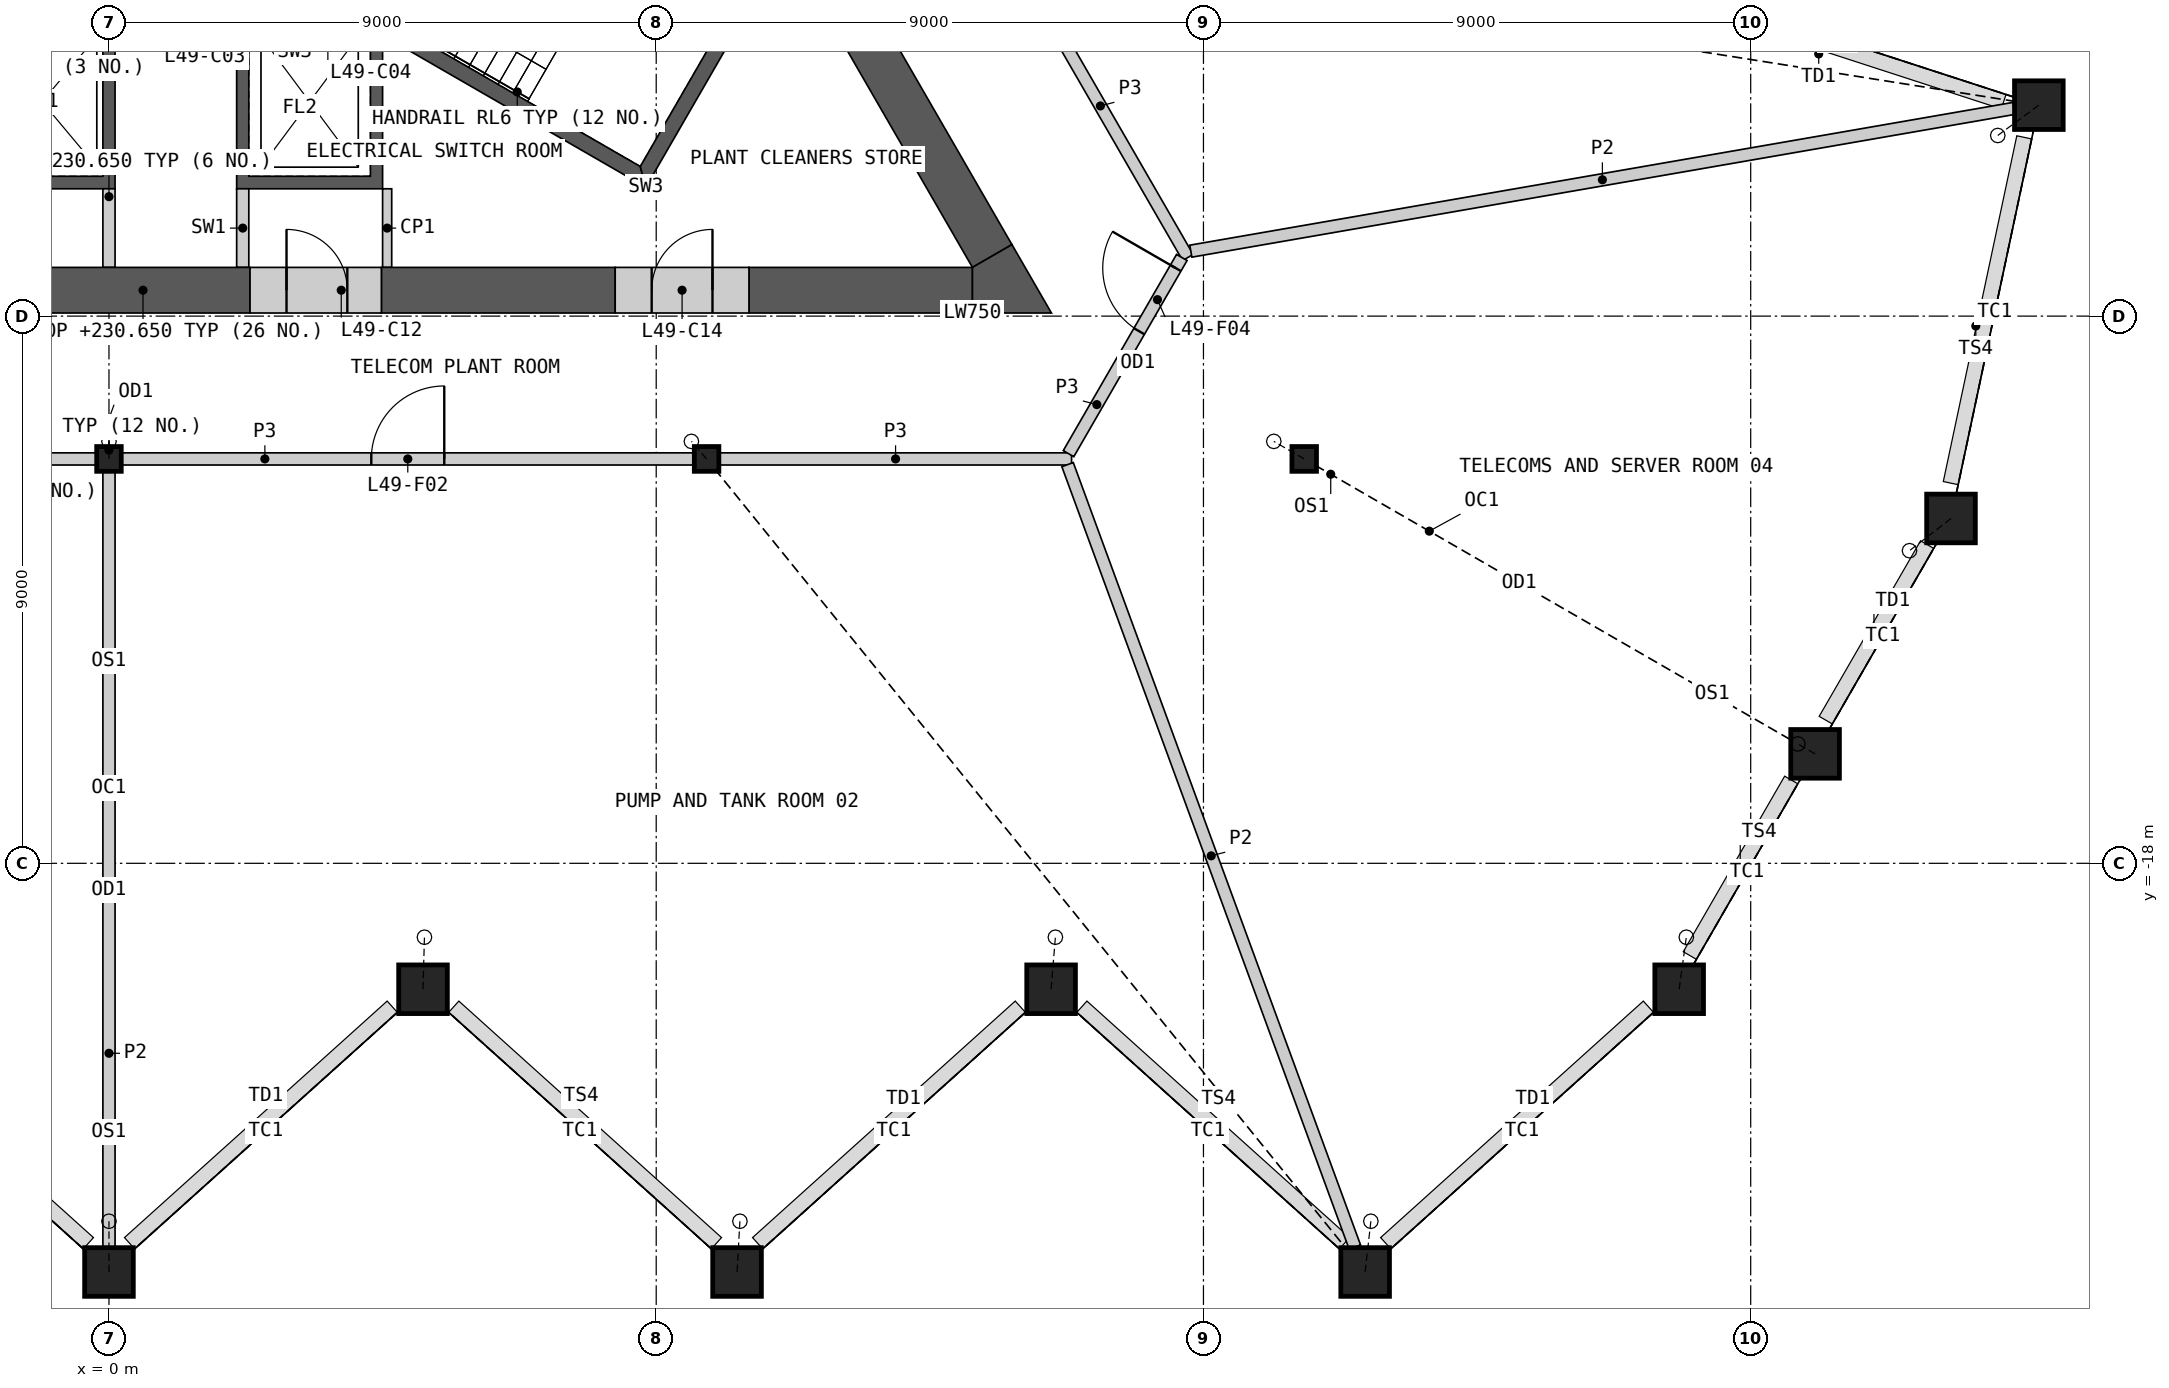
"""IFC4 building model, lengths in metres.
Left out: names, types, materials, properties, quantities, classifications, styles, units other than length and angle.
Written with IfcOpenShell. Run it as: python <this file> out.ifc"""

import sys

from ifc_helpers import new_model, si_unit, direction, frame, frame_2d, origin, origin_2d, place, context, subcontext, project, spatial, polyline, rectangle, hollow_rectangle, i_section, outline, extrude, element, fill, save


model = new_model("IFC4")
c1 = context("Model", 3, precision=1e-05, world=origin(), true_north=direction((0.0, 1.0)))
c2 = subcontext(c1, "Body", "Model", "MODEL_VIEW")
j1 = project(units=[si_unit("LENGTHUNIT", "METRE"), si_unit("PLANEANGLEUNIT", "RADIAN")], contexts=[c1])
p1 = place(None, origin())
s1 = spatial("IfcSite", under=j1, at=p1, CompositionType="ELEMENT")
p2 = place(p1, origin())
s2 = spatial("IfcBuilding", under=s1, at=p2, CompositionType="ELEMENT")
p3 = place(p2, frame((0.0, 0.0, 226.0)))
s3 = spatial("IfcBuildingStorey", under=s2, at=p3, CompositionType="ELEMENT", Elevation=226.0)
p4 = place(p3, frame((0.0, -24.722, 0.0), z_axis=(0.0, 0.164664520998, 0.986349631482), x_axis=(-1.0, 0.0, 0.0)))
e1 = element("IfcColumn", 1, at=p4, inside=s3, PredefinedType="COLUMN", context=c2, shape_type="SweptSolid", body=[
    extrude(hollow_rectangle(XDim=0.8, YDim=0.8, WallThickness=0.05, at=origin_2d()), frame((0.0, 0.0, 0.067)), (0.0, 0.0, 1.0), 4.936),
])
p5 = place(p3, frame((5.165, -20.071, 0.0), z_axis=(0.004620237367, 0.168734918824, 0.985650638196), x_axis=(-0.999625333796, 0.027371372517, 0.0)))
e2 = element("IfcColumn", 2, at=p5, inside=s3, PredefinedType="COLUMN", context=c2, shape_type="SweptSolid", body=[
    extrude(hollow_rectangle(XDim=0.8, YDim=0.8, WallThickness=0.05, at=origin_2d()), frame((0.0, 0.0, 0.069)), (0.0, 0.0, 1.0), 4.936),
])
p6 = place(p3, frame((10.329, -24.722, 0.0), z_axis=(0.00929478787, 0.164657407907, 0.98630702367), x_axis=(-0.998410538481, 0.056359530251, 0.0)))
e3 = element("IfcColumn", 3, at=p6, inside=s3, PredefinedType="COLUMN", context=c2, shape_type="SweptSolid", body=[
    extrude(hollow_rectangle(XDim=0.8, YDim=0.8, WallThickness=0.05, at=origin_2d()), frame((0.0, 0.0, 0.067)), (0.0, 0.0, 1.0), 4.936),
])
p7 = place(p3, frame((15.494, -20.071, 0.0), z_axis=(0.013907642807, 0.16872040028, 0.985565829359), x_axis=(-0.996619853329, 0.0821514939, 0.0)))
e4 = element("IfcColumn", 4, at=p7, inside=s3, PredefinedType="COLUMN", context=c2, shape_type="SweptSolid", body=[
    extrude(hollow_rectangle(XDim=0.8, YDim=0.8, WallThickness=0.05, at=origin_2d()), frame((0.0, 0.0, 0.069)), (0.0, 0.0, 1.0), 4.936),
])
p8 = place(p3, frame((20.659, -24.722, 0.0), z_axis=(0.01853903048, 0.164636221326, 0.986180114876), x_axis=(-0.993719605933, 0.111898814941, 0.0)))
e5 = element("IfcColumn", 5, at=p8, inside=s3, PredefinedType="COLUMN", context=c2, shape_type="SweptSolid", body=[
    extrude(hollow_rectangle(XDim=0.8, YDim=0.8, WallThickness=0.05, at=origin_2d()), frame((0.0, 0.0, 0.067)), (0.0, 0.0, 1.0), 4.936),
])
p9 = place(p3, frame((25.823, -20.071, 0.0), z_axis=(0.023191450174, 0.168691336745, 0.9853960572), x_axis=(-0.990681699534, 0.136197541123, 0.0)))
e6 = element("IfcColumn", 6, at=p9, inside=s3, PredefinedType="COLUMN", context=c2, shape_type="SweptSolid", body=[
    extrude(hollow_rectangle(XDim=0.8, YDim=0.8, WallThickness=0.05, at=origin_2d()), frame((0.0, 0.0, 0.069)), (0.0, 0.0, 1.0), 4.936),
])
p10 = place(p3, frame((28.059, -16.2, 0.0), z_axis=(-0.056374318387, 0.032548007504, 0.997879032465), x_axis=(-0.500003221507, -0.866023543838, 0.0)))
e7 = element("IfcColumn", 7, at=p10, inside=s3, PredefinedType="COLUMN", context=c2, shape_type="SweptSolid", body=[
    extrude(hollow_rectangle(XDim=0.8, YDim=0.8, WallThickness=0.05, at=origin_2d()), frame((0.0, 0.0, 0.026)), (0.0, 0.0, 1.0), 4.958),
])
p11 = place(p3, frame((30.294, -12.328, 0.0), z_axis=(-0.134482076703, -0.104410055973, 0.985399975268), x_axis=(0.613255605762, -0.789884524473, 0.0)))
e8 = element("IfcColumn", 8, at=p11, inside=s3, PredefinedType="COLUMN", context=c2, shape_type="SweptSolid", body=[
    extrude(hollow_rectangle(XDim=0.8, YDim=0.8, WallThickness=0.05, at=origin_2d()), frame((0.0, 0.0, 0.069)), (0.0, 0.0, 1.0), 4.936),
])
p12 = place(p3, frame((31.739, -5.53, 0.0), z_axis=(-0.133288732676, -0.098377485859, 0.986182530781), x_axis=(0.593843336629, -0.804580692995, 0.0)))
e9 = element("IfcColumn", 9, at=p12, inside=s3, PredefinedType="COLUMN", context=c2, shape_type="SweptSolid", body=[
    extrude(hollow_rectangle(XDim=0.8, YDim=0.8, WallThickness=0.05, at=origin_2d()), frame((0.0, 0.0, 0.067)), (0.0, 0.0, 1.0), 4.936),
])
p13 = place(p3, frame((0.0, -11.349, 0.0), z_axis=(0.0, 0.057618959063, 0.998338647733), x_axis=(-1.0, 0.0, 0.0)))
e10 = element("IfcColumn", 10, at=p13, inside=s3, PredefinedType="COLUMN", context=c2, shape_type="SweptSolid", body=[
    extrude(i_section(OverallWidth=0.404, OverallDepth=0.407, WebThickness=0.027, FlangeThickness=0.044, at=origin_2d()), frame((0.0, 0.0, 0.012)), (0.0, 0.0, 1.0), 4.985),
])
p14 = place(p3, frame((9.828, -11.349, 0.0), z_axis=(-0.049854859349, 0.057547308351, 0.997097186989), x_axis=(-0.755815657913, -0.654784461677, 0.0)))
e11 = element("IfcColumn", 11, at=p14, inside=s3, PredefinedType="COLUMN", context=c2, shape_type="SweptSolid", body=[
    extrude(i_section(OverallWidth=0.404, OverallDepth=0.407, WebThickness=0.027, FlangeThickness=0.044, at=origin_2d()), frame((0.0, 0.0, 0.016)), (0.0, 0.0, 1.0), 4.983),
])
p15 = place(p3, frame((19.657, -11.349, 0.0), z_axis=(-0.099340040995, 0.057333949442, 0.993400409954), x_axis=(-0.499868889286, -0.866101087359, 0.0)))
e12 = element("IfcColumn", 12, at=p15, inside=s3, PredefinedType="COLUMN", context=c2, shape_type="SweptSolid", body=[
    extrude(i_section(OverallWidth=0.404, OverallDepth=0.407, WebThickness=0.027, FlangeThickness=0.044, at=origin_2d()), frame((0.0, 0.0, 0.023)), (0.0, 0.0, 1.0), 4.986),
])
p16 = place(p3, origin())
e13 = element("IfcWall", 13, at=p16, inside=s3, PredefinedType="SHEAR", context=c2, shape_type="SweptSolid", body=[
    extrude(outline(polyline([(4.5, -4.4), (4.5, -6.906), (2.1, -6.906), (2.1, -4.4), (2.3, -4.4), (2.3, -6.7), (4.3, -6.7), (4.3, -4.4), (4.5, -4.4)])), origin(), (0.0, 0.0, 1.0), 4.65),
])
p17 = place(p3, origin())
e14 = element("IfcWall", 14, at=p17, inside=s3, PredefinedType="SHEAR", context=c2, shape_type="SweptSolid", body=[
    extrude(outline(polyline([(0.1, -4.4), (0.1, -6.906), (-4.5, -6.906), (-4.5, -4.4), (-4.3, -4.4), (-4.3, -6.7), (-2.3, -6.7), (-2.3, -4.4), (-2.1, -4.4), (-2.1, -6.7), (-0.1, -6.7), (-0.1, -4.4), (0.1, -4.4)])), origin(), (0.0, 0.0, 1.0), 4.65),
])
for number, where, z_axis, x_axis in (
    (15, (0.0, -6.906, 0.0), (0.0, 0.0, 1.0), (0.0, -1.0, 0.0)),
    (16, (2.2, -6.906, 0.0), (0.0, 0.0, 1.0), (0.0, -1.0, 0.0)),
):
    element("IfcWall", number, at=place(p3, frame(where, z_axis=z_axis, x_axis=x_axis)), inside=s3, PredefinedType="SHEAR", context=c2, shape_type="SweptSolid", body=[
        extrude(rectangle(XDim=1.293, YDim=0.2, at=frame_2d((0.646, 0.0))), origin(), (0.0, 0.0, 1.0), 4.65),
    ])
p18 = place(p3, origin())
e17 = element("IfcWall", 17, at=p18, inside=s3, PredefinedType="SHEAR", context=c2, shape_type="SweptSolid", body=[
    extrude(outline(polyline([(3.763, -3.956), (8.83, -6.881), (8.738, -6.539), (3.888, -3.739), (3.763, -3.956)])), origin(), (0.0, 0.0, 1.0), 4.65),
])
p19 = place(p3, origin())
e18 = element("IfcWall", 18, at=p19, inside=s3, PredefinedType="SHEAR", context=c2, shape_type="SweptSolid", body=[
    extrude(outline(polyline([(8.83, -6.881), (10.374, -4.206), (10.032, -4.298), (8.738, -6.539), (8.83, -6.881)])), origin(), (0.0, 0.0, 1.0), 4.65),
])
p20 = place(p3, frame((4.575, -6.906, 0.0), z_axis=(0.0, 0.0, 1.0), x_axis=(0.0, -1.0, 0.0)))
e19 = element("IfcWall", 19, at=p20, inside=s3, PredefinedType="PARTITIONING", context=c2, shape_type="SweptSolid", body=[
    extrude(rectangle(XDim=1.293, YDim=0.15, at=frame_2d((0.646, 0.0))), origin(), (0.0, 0.0, 1.0), 4.65),
])
p21 = place(p3, frame((4.48, -8.574, 0.0), z_axis=(0.0, 0.0, 1.0), x_axis=(1.0, 0.0, 0.0)))
e20 = element("IfcWall", 20, at=p21, inside=s3, PredefinedType="SHEAR", context=c2, shape_type="SweptSolid", body=[
    extrude(rectangle(XDim=3.845, YDim=0.75, at=frame_2d((1.923, 0.0))), origin(), (0.0, 0.0, 1.0), 4.65),
])
p22 = place(p3, frame((10.525, -8.574, 0.0), z_axis=(0.0, 0.0, 1.0), x_axis=(1.0, 0.0, 0.0)))
e21 = element("IfcWall", 21, at=p22, inside=s3, PredefinedType="SHEAR", context=c2, shape_type="SweptSolid", body=[
    extrude(rectangle(XDim=3.676, YDim=0.75, at=frame_2d((1.838, 0.0))), origin(), (0.0, 0.0, 1.0), 4.65),
])
p23 = place(p3, frame((-1.2, -8.574, 0.0), z_axis=(0.0, 0.0, 1.0), x_axis=(1.0, 0.0, 0.0)))
e22 = element("IfcWall", 22, at=p23, inside=s3, PredefinedType="SHEAR", context=c2, shape_type="SweptSolid", body=[
    extrude(rectangle(XDim=3.52, YDim=0.75, at=frame_2d((1.76, 0.0))), origin(), (0.0, 0.0, 1.0), 4.65),
])
p24 = place(p3, frame((14.526, -8.011, 0.0), z_axis=(0.0, 0.0, 1.0), x_axis=(-0.499994855372, 0.866028374016, 0.0)))
e23 = element("IfcWall", 23, at=p24, inside=s3, PredefinedType="SHEAR", context=c2, shape_type="SweptSolid", body=[
    extrude(rectangle(XDim=14.301, YDim=0.75, at=frame_2d((7.15, 0.0))), origin(), (0.0, 0.0, 1.0), 4.65),
])
p25 = place(p3, origin())
e24 = element("IfcWall", 24, at=p25, inside=s3, PredefinedType="SHEAR", context=c2, shape_type="SweptSolid", body=[
    extrude(outline(polyline([(14.201, -8.949), (14.201, -8.199), (14.851, -7.824), (15.5, -8.949), (14.201, -8.949)])), origin(), (0.0, 0.0, 1.0), 4.65),
])
p26 = place(p3, frame((2.32, -8.574, 0.0), z_axis=(0.0, 0.0, 1.0), x_axis=(1.0, 0.0, 0.0)))
e25 = element("IfcWall", 25, at=p26, inside=s3, PredefinedType="SHEAR", context=c2, shape_type="SweptSolid", body=[
    extrude(rectangle(XDim=2.16, YDim=0.75, at=frame_2d((1.08, 0.0))), origin(), (0.0, 0.0, 1.0), 4.65),
])
p27 = place(p26, frame((0.6, 0.0, 0.0)))
e26 = element("IfcOpeningElement", 26, at=p27, cuts=e25, PredefinedType="OPENING", context=c2, shape_type="SweptSolid", body=[
    extrude(rectangle(XDim=1.0, YDim=2.1, at=frame_2d((0.5, 1.05))), frame((0.0, 0.385, 0.0), z_axis=(0.0, -1.0, 0.0), x_axis=(1.0, 0.0, 0.0)), (0.0, 0.0, 1.0), 0.77),
])
p28 = place(p3, frame((8.325, -8.574, 0.0), z_axis=(0.0, 0.0, 1.0), x_axis=(1.0, 0.0, 0.0)))
e27 = element("IfcWall", 27, at=p28, inside=s3, PredefinedType="SHEAR", context=c2, shape_type="SweptSolid", body=[
    extrude(rectangle(XDim=2.2, YDim=0.75, at=frame_2d((1.1, 0.0))), origin(), (0.0, 0.0, 1.0), 4.65),
])
p29 = place(p28, frame((0.6, 0.0, 0.0)))
e28 = element("IfcOpeningElement", 28, at=p29, cuts=e27, PredefinedType="OPENING", context=c2, shape_type="SweptSolid", body=[
    extrude(rectangle(XDim=1.0, YDim=2.1, at=frame_2d((0.5, 1.05))), frame((0.0, 0.385, 0.0), z_axis=(0.0, -1.0, 0.0), x_axis=(1.0, 0.0, 0.0)), (0.0, 0.0, 1.0), 0.77),
])
p30 = place(p3, frame((-9.615, -11.349, 0.0), z_axis=(0.0, 0.0, 1.0), x_axis=(1.0, 0.0, 0.0)))
e29 = element("IfcWall", 29, at=p30, inside=s3, PredefinedType="PARTITIONING", context=c2, shape_type="SweptSolid", body=[
    extrude(rectangle(XDim=9.401, YDim=0.2, at=frame_2d((4.701, 0.0))), origin(), (0.0, 0.0, 1.0), 4.65),
])
p31 = place(p30, frame((4.101, 0.0, 0.0)))
e30 = element("IfcOpeningElement", 30, at=p31, cuts=e29, PredefinedType="OPENING", context=c2, shape_type="SweptSolid", body=[
    extrude(rectangle(XDim=1.2, YDim=2.1, at=frame_2d((0.6, 1.05))), frame((0.0, 0.11, 0.0), z_axis=(0.0, -1.0, 0.0), x_axis=(1.0, 0.0, 0.0)), (0.0, 0.0, 1.0), 0.22),
])
p32 = place(p3, frame((0.214, -11.349, 0.0), z_axis=(0.0, 0.0, 1.0), x_axis=(1.0, 0.0, 0.0)))
e31 = element("IfcWall", 31, at=p32, inside=s3, PredefinedType="PARTITIONING", context=c2, shape_type="SweptSolid", body=[
    extrude(rectangle(XDim=9.401, YDim=0.2, at=frame_2d((4.701, 0.0))), origin(), (0.0, 0.0, 1.0), 4.65),
])
p33 = place(p32, frame((4.101, 0.0, 0.0)))
e32 = element("IfcOpeningElement", 32, at=p33, cuts=e31, PredefinedType="OPENING", context=c2, shape_type="SweptSolid", body=[
    extrude(rectangle(XDim=1.2, YDim=2.1, at=frame_2d((0.6, 1.05))), frame((0.0, 0.11, 0.0), z_axis=(0.0, -1.0, 0.0), x_axis=(1.0, 0.0, 0.0)), (0.0, 0.0, 1.0), 0.22),
])
p34 = place(p3, frame((10.042, -11.349, 0.0), z_axis=(0.0, 0.0, 1.0), x_axis=(1.0, 0.0, 0.0)))
e33 = element("IfcWall", 33, at=p34, inside=s3, PredefinedType="PARTITIONING", context=c2, shape_type="SweptSolid", body=[
    extrude(rectangle(XDim=5.789, YDim=0.2, at=frame_2d((2.894, 0.0))), origin(), (0.0, 0.0, 1.0), 4.65),
])
p35 = place(p3, frame((14.866, -3.051, 0.0), z_axis=(0.0, 0.0, 1.0), x_axis=(0.499975807604, -0.86603937082, 0.0)))
e34 = element("IfcWall", 34, at=p35, inside=s3, PredefinedType="PARTITIONING", context=c2, shape_type="SweptSolid", body=[
    extrude(rectangle(XDim=5.756, YDim=0.2, at=frame_2d((2.878, 0.0))), origin(), (0.0, 0.0, 1.0), 4.65),
])
p36 = place(p3, frame((15.781, -11.262, 0.0), z_axis=(0.0, 0.0, 1.0), x_axis=(0.499958791762, 0.866049194065, 0.0)))
e35 = element("IfcWall", 35, at=p36, inside=s3, PredefinedType="PARTITIONING", context=c2, shape_type="SweptSolid", body=[
    extrude(rectangle(XDim=3.726, YDim=0.2, at=frame_2d((1.863, 0.0))), origin(), (0.0, 0.0, 1.0), 4.65),
])
p37 = place(p36, frame((2.325, 0.0, 0.0)))
e36 = element("IfcOpeningElement", 36, at=p37, cuts=e35, PredefinedType="OPENING", context=c2, shape_type="SweptSolid", body=[
    extrude(rectangle(XDim=1.2, YDim=2.1, at=frame_2d((0.6, 1.05))), frame((0.0, 0.11, 0.0), z_axis=(0.0, -1.0, 0.0), x_axis=(1.0, 0.0, 0.0)), (0.0, 0.0, 1.0), 0.22),
])
p38 = place(p3, frame((17.792, -7.932, 0.0), z_axis=(0.0, 0.0, 1.0), x_axis=(0.985288995773, 0.170896444691, 0.0)))
e37 = element("IfcWall", 37, at=p38, inside=s3, PredefinedType="PARTITIONING", context=c2, shape_type="SweptSolid", body=[
    extrude(rectangle(XDim=13.739, YDim=0.2, at=frame_2d((6.869, 0.0))), origin(), (0.0, 0.0, 1.0), 4.65),
])
p39 = place(p3, frame((15.765, -11.443, 0.0), z_axis=(0.0, 0.0, 1.0), x_axis=(0.344647088239, -0.938732328498, 0.0)))
e38 = element("IfcWall", 38, at=p39, inside=s3, PredefinedType="PARTITIONING", context=c2, shape_type="SweptSolid", body=[
    extrude(rectangle(XDim=13.708, YDim=0.2, at=frame_2d((6.854, 0.0))), origin(), (0.0, 0.0, 1.0), 4.65),
])
p40 = place(p3, frame((0.0, -24.312, 0.0), z_axis=(0.0, 0.0, 1.0), x_axis=(0.0, 1.0, 0.0)))
e39 = element("IfcWall", 39, at=p40, inside=s3, PredefinedType="PARTITIONING", context=c2, shape_type="SweptSolid", body=[
    extrude(rectangle(XDim=12.749, YDim=0.2, at=frame_2d((6.375, 0.0))), origin(), (0.0, 0.0, 1.0), 4.65),
])
p41 = place(p27, origin())
e40 = element("IfcDoor", 40, at=p41, inside=s3, OperationType="SINGLE_SWING_LEFT", PredefinedType="DOOR", context=c2, shape_type="SweptSolid", body=[
    extrude(rectangle(XDim=1.0, YDim=2.1, at=frame_2d((0.5, 1.05))), frame((0.0, 0.13, 0.0), z_axis=(0.0, -1.0, 0.0), x_axis=(1.0, 0.0, 0.0)), (0.0, 0.0, 1.0), 0.05),
])
fill(e26, e40)
p42 = place(p29, origin())
e41 = element("IfcDoor", 41, at=p42, inside=s3, OperationType="SINGLE_SWING_RIGHT", PredefinedType="DOOR", context=c2, shape_type="SweptSolid", body=[
    extrude(rectangle(XDim=1.0, YDim=2.1, at=frame_2d((0.5, 1.05))), frame((0.0, 0.13, 0.0), z_axis=(0.0, -1.0, 0.0), x_axis=(1.0, 0.0, 0.0)), (0.0, 0.0, 1.0), 0.05),
])
fill(e28, e41)
p43 = place(p33, origin())
e42 = element("IfcDoor", 42, at=p43, inside=s3, OperationType="SINGLE_SWING_RIGHT", PredefinedType="DOOR", context=c2, shape_type="SweptSolid", body=[
    extrude(rectangle(XDim=1.2, YDim=2.1, at=frame_2d((0.6, 1.05))), frame((0.0, 0.025, 0.0), z_axis=(0.0, -1.0, 0.0), x_axis=(1.0, 0.0, 0.0)), (0.0, 0.0, 1.0), 0.05),
])
fill(e32, e42)
p44 = place(p37, origin())
e43 = element("IfcDoor", 43, at=p44, inside=s3, OperationType="SINGLE_SWING_RIGHT", PredefinedType="DOOR", context=c2, shape_type="SweptSolid", body=[
    extrude(rectangle(XDim=1.2, YDim=2.1, at=frame_2d((0.6, 1.05))), frame((0.0, 0.025, 0.0), z_axis=(0.0, -1.0, 0.0), x_axis=(1.0, 0.0, 0.0)), (0.0, 0.0, 1.0), 0.05),
])
fill(e36, e43)
save(model, sys.argv[1])
